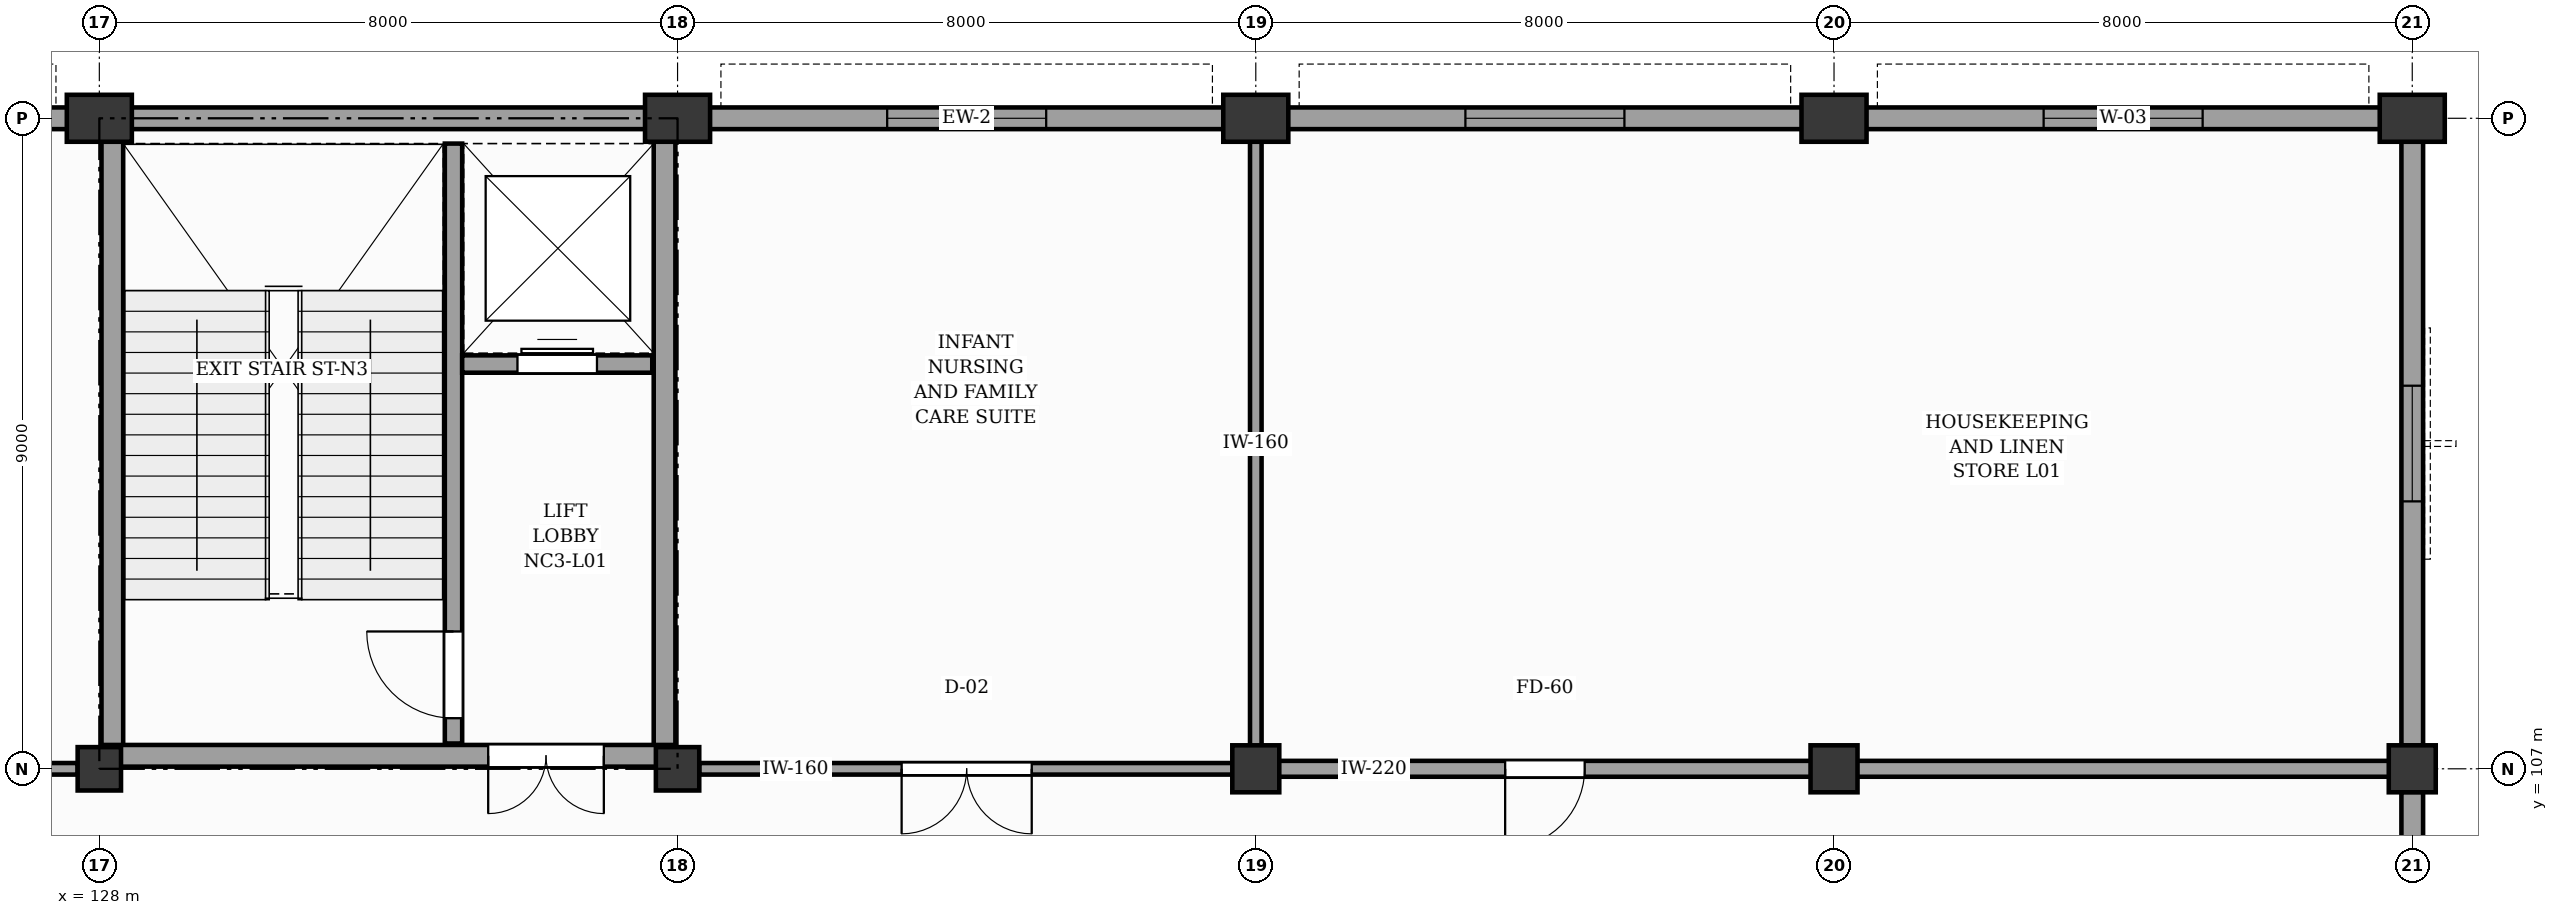
"""IFC4 building model, lengths in metres.
Left out: names, types, materials, properties, quantities, classifications, styles, units other than length and angle.
Written with IfcOpenShell. Run it as: python <this file> out.ifc"""

import sys

from ifc_helpers import new_model, si_unit, direction, frame, frame_2d, origin, origin_2d, place, context, subcontext, project, spatial, rectangle, extrude, element, fill, save


model = new_model("IFC4")
c1 = context("Model", 3, precision=1e-05, world=origin(), true_north=direction((0.0, 1.0)))
c2 = subcontext(c1, "Body", "Model", "MODEL_VIEW")
j1 = project(units=[si_unit("LENGTHUNIT", "METRE"), si_unit("PLANEANGLEUNIT", "RADIAN")], contexts=[c1])
p1 = place(None, origin())
s1 = spatial("IfcSite", under=j1, at=p1, CompositionType="ELEMENT")
p2 = place(p1, origin())
s2 = spatial("IfcBuilding", under=s1, at=p2, CompositionType="ELEMENT")
p3 = place(p2, frame((0.0, 0.0, 4.8)))
s3 = spatial("IfcBuildingStorey", under=s2, at=p3, CompositionType="ELEMENT", Elevation=4.8)
p4 = place(p3, frame((128.0, 107.0, 0.0), z_axis=(0.0, 0.0, 1.0), x_axis=(1.0, 0.0, 0.0)))
e1 = element("IfcColumn", 1, at=p4, inside=s3, PredefinedType="COLUMN", context=c2, shape_type="SweptSolid", body=[
    extrude(rectangle(XDim=0.6, YDim=0.6, at=origin_2d()), origin(), (0.0, 0.0, 1.0), 4.8),
])
p5 = place(p3, frame((128.0, 116.0, 0.0), z_axis=(0.0, 0.0, 1.0), x_axis=(1.0, 0.0, 0.0)))
e2 = element("IfcColumn", 2, at=p5, inside=s3, PredefinedType="PILASTER", context=c2, shape_type="SweptSolid", body=[
    extrude(rectangle(XDim=0.9, YDim=0.65, at=origin_2d()), origin(), (0.0, 0.0, 1.0), 4.8),
])
p6 = place(p3, frame((136.0, 107.0, 0.0), z_axis=(0.0, 0.0, 1.0), x_axis=(1.0, 0.0, 0.0)))
e3 = element("IfcColumn", 3, at=p6, inside=s3, PredefinedType="COLUMN", context=c2, shape_type="SweptSolid", body=[
    extrude(rectangle(XDim=0.6, YDim=0.6, at=origin_2d()), origin(), (0.0, 0.0, 1.0), 4.8),
])
p7 = place(p3, frame((136.0, 116.0, 0.0), z_axis=(0.0, 0.0, 1.0), x_axis=(1.0, 0.0, 0.0)))
e4 = element("IfcColumn", 4, at=p7, inside=s3, PredefinedType="PILASTER", context=c2, shape_type="SweptSolid", body=[
    extrude(rectangle(XDim=0.9, YDim=0.65, at=origin_2d()), origin(), (0.0, 0.0, 1.0), 4.8),
])
p8 = place(p3, frame((144.0, 107.0, 0.0), z_axis=(0.0, 0.0, 1.0), x_axis=(1.0, 0.0, 0.0)))
e5 = element("IfcColumn", 5, at=p8, inside=s3, PredefinedType="COLUMN", context=c2, shape_type="SweptSolid", body=[
    extrude(rectangle(XDim=0.65, YDim=0.65, at=origin_2d()), origin(), (0.0, 0.0, 1.0), 4.8),
])
p9 = place(p3, frame((144.0, 116.0, 0.0), z_axis=(0.0, 0.0, 1.0), x_axis=(1.0, 0.0, 0.0)))
e6 = element("IfcColumn", 6, at=p9, inside=s3, PredefinedType="PILASTER", context=c2, shape_type="SweptSolid", body=[
    extrude(rectangle(XDim=0.9, YDim=0.65, at=origin_2d()), origin(), (0.0, 0.0, 1.0), 4.8),
])
p10 = place(p3, frame((152.0, 107.0, 0.0), z_axis=(0.0, 0.0, 1.0), x_axis=(1.0, 0.0, 0.0)))
e7 = element("IfcColumn", 7, at=p10, inside=s3, PredefinedType="COLUMN", context=c2, shape_type="SweptSolid", body=[
    extrude(rectangle(XDim=0.65, YDim=0.65, at=origin_2d()), origin(), (0.0, 0.0, 1.0), 4.8),
])
p11 = place(p3, frame((152.0, 116.0, 0.0), z_axis=(0.0, 0.0, 1.0), x_axis=(1.0, 0.0, 0.0)))
e8 = element("IfcColumn", 8, at=p11, inside=s3, PredefinedType="PILASTER", context=c2, shape_type="SweptSolid", body=[
    extrude(rectangle(XDim=0.9, YDim=0.65, at=origin_2d()), origin(), (0.0, 0.0, 1.0), 4.8),
])
p12 = place(p3, frame((160.0, 107.0, 0.0), z_axis=(0.0, 0.0, 1.0), x_axis=(1.0, 0.0, 0.0)))
e9 = element("IfcColumn", 9, at=p12, inside=s3, PredefinedType="COLUMN", context=c2, shape_type="SweptSolid", body=[
    extrude(rectangle(XDim=0.65, YDim=0.65, at=origin_2d()), origin(), (0.0, 0.0, 1.0), 4.8),
])
p13 = place(p3, frame((160.0, 116.0, 0.0), z_axis=(0.0, 0.0, 1.0), x_axis=(1.0, 0.0, 0.0)))
e10 = element("IfcColumn", 10, at=p13, inside=s3, PredefinedType="PILASTER", context=c2, shape_type="SweptSolid", body=[
    extrude(rectangle(XDim=0.9, YDim=0.65, at=origin_2d()), origin(), (0.0, 0.0, 1.0), 4.8),
])
p14 = place(p3, frame((120.4, 116.0, 0.0), z_axis=(0.0, 0.0, 1.0), x_axis=(1.0, 0.0, 0.0)))
e11 = element("IfcWall", 11, at=p14, inside=s3, PredefinedType="SOLIDWALL", context=c2, shape_type="SweptSolid", body=[
    extrude(rectangle(XDim=7.2, YDim=0.3, at=frame_2d((3.6, 0.0))), origin(), (0.0, 0.0, 1.0), 3.18),
])
p15 = place(p14, frame((2.5, 0.0, 0.9)))
e12 = element("IfcOpeningElement", 12, at=p15, cuts=e11, PredefinedType="OPENING", context=c2, shape_type="SweptSolid", body=[
    extrude(rectangle(XDim=2.2, YDim=2.14, at=frame_2d((1.1, 1.07))), frame((0.0, 0.16, 0.0), z_axis=(0.0, -1.0, 0.0), x_axis=(1.0, 0.0, 0.0)), (0.0, 0.0, 1.0), 0.32),
])
p16 = place(p3, frame((128.4, 116.0, 0.0), z_axis=(0.0, 0.0, 1.0), x_axis=(1.0, 0.0, 0.0)))
e13 = element("IfcWall", 13, at=p16, inside=s3, PredefinedType="SOLIDWALL", context=c2, shape_type="SweptSolid", body=[
    extrude(rectangle(XDim=7.2, YDim=0.3, at=frame_2d((3.6, 0.0))), origin(), (0.0, 0.0, 1.0), 3.84),
])
p17 = place(p3, frame((136.4, 116.0, 0.0), z_axis=(0.0, 0.0, 1.0), x_axis=(1.0, 0.0, 0.0)))
e14 = element("IfcWall", 14, at=p17, inside=s3, PredefinedType="SOLIDWALL", context=c2, shape_type="SweptSolid", body=[
    extrude(rectangle(XDim=7.2, YDim=0.3, at=frame_2d((3.6, 0.0))), origin(), (0.0, 0.0, 1.0), 3.84),
])
p18 = place(p17, frame((2.5, 0.0, 0.9)))
e15 = element("IfcOpeningElement", 15, at=p18, cuts=e14, PredefinedType="OPENING", context=c2, shape_type="SweptSolid", body=[
    extrude(rectangle(XDim=2.2, YDim=2.2, at=frame_2d((1.1, 1.1))), frame((0.0, 0.16, 0.0), z_axis=(0.0, -1.0, 0.0), x_axis=(1.0, 0.0, 0.0)), (0.0, 0.0, 1.0), 0.32),
])
p19 = place(p3, frame((144.4, 116.0, 0.0), z_axis=(0.0, 0.0, 1.0), x_axis=(1.0, 0.0, 0.0)))
e16 = element("IfcWall", 16, at=p19, inside=s3, PredefinedType="SOLIDWALL", context=c2, shape_type="SweptSolid", body=[
    extrude(rectangle(XDim=7.2, YDim=0.3, at=frame_2d((3.6, 0.0))), origin(), (0.0, 0.0, 1.0), 3.84),
])
p20 = place(p19, frame((2.5, 0.0, 0.9)))
e17 = element("IfcOpeningElement", 17, at=p20, cuts=e16, PredefinedType="OPENING", context=c2, shape_type="SweptSolid", body=[
    extrude(rectangle(XDim=2.2, YDim=2.2, at=frame_2d((1.1, 1.1))), frame((0.0, 0.16, 0.0), z_axis=(0.0, -1.0, 0.0), x_axis=(1.0, 0.0, 0.0)), (0.0, 0.0, 1.0), 0.32),
])
p21 = place(p3, frame((152.4, 116.0, 0.0), z_axis=(0.0, 0.0, 1.0), x_axis=(1.0, 0.0, 0.0)))
e18 = element("IfcWall", 18, at=p21, inside=s3, PredefinedType="SOLIDWALL", context=c2, shape_type="SweptSolid", body=[
    extrude(rectangle(XDim=7.2, YDim=0.3, at=frame_2d((3.6, 0.0))), origin(), (0.0, 0.0, 1.0), 3.84),
])
p22 = place(p21, frame((2.5, 0.0, 0.9)))
e19 = element("IfcOpeningElement", 19, at=p22, cuts=e18, PredefinedType="OPENING", context=c2, shape_type="SweptSolid", body=[
    extrude(rectangle(XDim=2.2, YDim=2.2, at=frame_2d((1.1, 1.1))), frame((0.0, 0.16, 0.0), z_axis=(0.0, -1.0, 0.0), x_axis=(1.0, 0.0, 0.0)), (0.0, 0.0, 1.0), 0.32),
])
p23 = place(p3, frame((160.0, 98.32, 0.0), z_axis=(0.0, 0.0, 1.0), x_axis=(0.0, 1.0, 0.0)))
e20 = element("IfcWall", 20, at=p23, inside=s3, PredefinedType="SOLIDWALL", context=c2, shape_type="SweptSolid", body=[
    extrude(rectangle(XDim=8.36, YDim=0.3, at=frame_2d((4.18, 0.0))), origin(), (0.0, 0.0, 1.0), 3.71),
])
p24 = place(p23, frame((3.38, 0.0, 0.95)))
e21 = element("IfcOpeningElement", 21, at=p24, cuts=e20, PredefinedType="OPENING", context=c2, shape_type="SweptSolid", body=[
    extrude(rectangle(XDim=1.6, YDim=2.1, at=frame_2d((0.8, 1.05))), frame((0.0, 0.16, 0.0), z_axis=(0.0, -1.0, 0.0), x_axis=(1.0, 0.0, 0.0)), (0.0, 0.0, 1.0), 0.32),
])
p25 = place(p3, frame((160.0, 107.32, 0.0), z_axis=(0.0, 0.0, 1.0), x_axis=(0.0, 1.0, 0.0)))
e22 = element("IfcWall", 22, at=p25, inside=s3, PredefinedType="SOLIDWALL", context=c2, shape_type="SweptSolid", body=[
    extrude(rectangle(XDim=8.36, YDim=0.3, at=frame_2d((4.18, 0.0))), origin(), (0.0, 0.0, 1.0), 3.81),
])
p26 = place(p25, frame((3.38, 0.0, 0.95)))
e23 = element("IfcOpeningElement", 23, at=p26, cuts=e22, PredefinedType="OPENING", context=c2, shape_type="SweptSolid", body=[
    extrude(rectangle(XDim=1.6, YDim=2.1, at=frame_2d((0.8, 1.05))), frame((0.0, 0.16, 0.0), z_axis=(0.0, -1.0, 0.0), x_axis=(1.0, 0.0, 0.0)), (0.0, 0.0, 1.0), 0.32),
])
p27 = place(p3, frame((132.9, 107.35, 0.0), z_axis=(0.0, 0.0, 1.0), x_axis=(0.0, 1.0, 0.0)))
e24 = element("IfcWall", 24, at=p27, inside=s3, PredefinedType="SHEAR", context=c2, shape_type="SweptSolid", body=[
    extrude(rectangle(XDim=8.3, YDim=0.24, at=frame_2d((4.15, 0.0))), origin(), (0.0, 0.0, 1.0), 4.52),
])
p28 = place(p27, frame((0.35, 0.0, 0.0)))
e25 = element("IfcOpeningElement", 25, at=p28, cuts=e24, PredefinedType="OPENING", context=c2, shape_type="SweptSolid", body=[
    extrude(rectangle(XDim=1.2, YDim=2.15, at=frame_2d((0.6, 1.075))), frame((0.0, 0.13, 0.0), z_axis=(0.0, -1.0, 0.0), x_axis=(1.0, 0.0, 0.0)), (0.0, 0.0, 1.0), 0.26),
])
p29 = place(p3, frame((133.02, 112.6, 0.0), z_axis=(0.0, 0.0, 1.0), x_axis=(1.0, 0.0, 0.0)))
e26 = element("IfcWall", 26, at=p29, inside=s3, PredefinedType="SHEAR", context=c2, shape_type="SweptSolid", body=[
    extrude(rectangle(XDim=2.63, YDim=0.24, at=frame_2d((1.315, 0.0))), origin(), (0.0, 0.0, 1.0), 4.52),
])
p30 = place(p29, frame((0.765, 0.0, 0.0)))
e27 = element("IfcOpeningElement", 27, at=p30, cuts=e26, PredefinedType="OPENING", context=c2, shape_type="SweptSolid", body=[
    extrude(rectangle(XDim=1.1, YDim=2.15, at=frame_2d((0.55, 1.075))), frame((0.0, 0.13, 0.0), z_axis=(0.0, -1.0, 0.0), x_axis=(1.0, 0.0, 0.0)), (0.0, 0.0, 1.0), 0.26),
])
for number, where, z_axis, x_axis in (
    (28, (128.18, 107.18, 0.0), (0.0, 0.0, 1.0), (0.0, 1.0, 0.0)),
    (29, (135.82, 107.18, 0.0), (0.0, 0.0, 1.0), (0.0, 1.0, 0.0)),
):
    element("IfcWall", number, at=place(p3, frame(where, z_axis=z_axis, x_axis=x_axis)), inside=s3, PredefinedType="SHEAR", context=c2, shape_type="SweptSolid", body=[
        extrude(rectangle(XDim=8.64, YDim=0.3, at=frame_2d((4.32, 0.0))), origin(), (0.0, 0.0, 1.0), 4.52),
    ])
p31 = place(p3, frame((128.03, 107.18, 0.0), z_axis=(0.0, 0.0, 1.0), x_axis=(1.0, 0.0, 0.0)))
e30 = element("IfcWall", 30, at=p31, inside=s3, PredefinedType="SHEAR", context=c2, shape_type="SweptSolid", body=[
    extrude(rectangle(XDim=7.94, YDim=0.3, at=frame_2d((3.97, 0.0))), origin(), (0.0, 0.0, 1.0), 4.52),
])
p32 = place(p31, frame((5.35, 0.0, 0.0)))
e31 = element("IfcOpeningElement", 31, at=p32, cuts=e30, PredefinedType="OPENING", context=c2, shape_type="SweptSolid", body=[
    extrude(rectangle(XDim=1.6, YDim=2.15, at=frame_2d((0.8, 1.075))), frame((0.0, 0.16, 0.0), z_axis=(0.0, -1.0, 0.0), x_axis=(1.0, 0.0, 0.0)), (0.0, 0.0, 1.0), 0.32),
])
p33 = place(p3, frame((123.0, 107.0, 0.0), z_axis=(0.0, 0.0, 1.0), x_axis=(1.0, 0.0, 0.0)))
e32 = element("IfcWall", 32, at=p33, inside=s3, PredefinedType="PARTITIONING", context=c2, shape_type="SweptSolid", body=[
    extrude(rectangle(XDim=4.7, YDim=0.16, at=frame_2d((2.35, 0.0))), origin(), (0.0, 0.0, 1.0), 3.7),
])
p34 = place(p33, frame((0.2, 0.0, 0.0)))
e33 = element("IfcOpeningElement", 33, at=p34, cuts=e32, PredefinedType="OPENING", context=c2, shape_type="SweptSolid", body=[
    extrude(rectangle(XDim=1.0, YDim=2.1, at=frame_2d((0.5, 1.05))), frame((0.0, 0.09, 0.0), z_axis=(0.0, -1.0, 0.0), x_axis=(1.0, 0.0, 0.0)), (0.0, 0.0, 1.0), 0.18),
])
p35 = place(p3, frame((136.3, 107.0, 0.0), z_axis=(0.0, 0.0, 1.0), x_axis=(1.0, 0.0, 0.0)))
e34 = element("IfcWall", 34, at=p35, inside=s3, PredefinedType="PARTITIONING", context=c2, shape_type="SweptSolid", body=[
    extrude(rectangle(XDim=7.4, YDim=0.16, at=frame_2d((3.7, 0.0))), origin(), (0.0, 0.0, 1.0), 3.7),
])
p36 = place(p35, frame((2.8, 0.0, 0.0)))
e35 = element("IfcOpeningElement", 35, at=p36, cuts=e34, PredefinedType="OPENING", context=c2, shape_type="SweptSolid", body=[
    extrude(rectangle(XDim=1.8, YDim=2.25, at=frame_2d((0.9, 1.125))), frame((0.0, 0.09, 0.0), z_axis=(0.0, -1.0, 0.0), x_axis=(1.0, 0.0, 0.0)), (0.0, 0.0, 1.0), 0.18),
])
p37 = place(p3, frame((144.0, 107.3, 0.0), z_axis=(0.0, 0.0, 1.0), x_axis=(0.0, 1.0, 0.0)))
e36 = element("IfcWall", 36, at=p37, inside=s3, PredefinedType="PARTITIONING", context=c2, shape_type="SweptSolid", body=[
    extrude(rectangle(XDim=8.4, YDim=0.16, at=frame_2d((4.2, 0.0))), origin(), (0.0, 0.0, 1.0), 3.7),
])
p38 = place(p3, frame((144.3, 107.0, 0.0), z_axis=(0.0, 0.0, 1.0), x_axis=(1.0, 0.0, 0.0)))
e37 = element("IfcWall", 37, at=p38, inside=s3, PredefinedType="SOLIDWALL", context=c2, shape_type="SweptSolid", body=[
    extrude(rectangle(XDim=7.4, YDim=0.22, at=frame_2d((3.7, 0.0))), origin(), (0.0, 0.0, 1.0), 3.7),
])
p39 = place(p38, frame((3.15, 0.0, 0.0)))
e38 = element("IfcOpeningElement", 38, at=p39, cuts=e37, PredefinedType="OPENING", context=c2, shape_type="SweptSolid", body=[
    extrude(rectangle(XDim=1.1, YDim=2.15, at=frame_2d((0.55, 1.075))), frame((0.0, 0.12, 0.0), z_axis=(0.0, -1.0, 0.0), x_axis=(1.0, 0.0, 0.0)), (0.0, 0.0, 1.0), 0.24),
])
p40 = place(p3, frame((152.3, 107.0, 0.0), z_axis=(0.0, 0.0, 1.0), x_axis=(1.0, 0.0, 0.0)))
e39 = element("IfcWall", 39, at=p40, inside=s3, PredefinedType="SOLIDWALL", context=c2, shape_type="SweptSolid", body=[
    extrude(rectangle(XDim=7.4, YDim=0.22, at=frame_2d((3.7, 0.0))), origin(), (0.0, 0.0, 1.0), 3.7),
])
p41 = place(p18, origin())
e40 = element("IfcWindow", 40, at=p41, inside=s3, PartitioningType="SINGLE_PANEL", PredefinedType="WINDOW", context=c2, shape_type="SweptSolid", body=[
    extrude(rectangle(XDim=2.2, YDim=2.2, at=frame_2d((1.1, 1.1))), frame((0.0, 0.03, 0.0), z_axis=(0.0, -1.0, 0.0), x_axis=(1.0, 0.0, 0.0)), (0.0, 0.0, 1.0), 0.06),
])
fill(e15, e40)
p42 = place(p20, origin())
e41 = element("IfcWindow", 41, at=p42, inside=s3, PartitioningType="SINGLE_PANEL", PredefinedType="WINDOW", context=c2, shape_type="SweptSolid", body=[
    extrude(rectangle(XDim=2.2, YDim=2.2, at=frame_2d((1.1, 1.1))), frame((0.0, 0.03, 0.0), z_axis=(0.0, -1.0, 0.0), x_axis=(1.0, 0.0, 0.0)), (0.0, 0.0, 1.0), 0.06),
])
fill(e17, e41)
p43 = place(p22, origin())
e42 = element("IfcWindow", 42, at=p43, inside=s3, PartitioningType="SINGLE_PANEL", PredefinedType="WINDOW", context=c2, shape_type="SweptSolid", body=[
    extrude(rectangle(XDim=2.2, YDim=2.2, at=frame_2d((1.1, 1.1))), frame((0.0, 0.03, 0.0), z_axis=(0.0, -1.0, 0.0), x_axis=(1.0, 0.0, 0.0)), (0.0, 0.0, 1.0), 0.06),
])
fill(e19, e42)
p44 = place(p26, origin())
e43 = element("IfcWindow", 43, at=p44, inside=s3, PartitioningType="SINGLE_PANEL", PredefinedType="WINDOW", context=c2, shape_type="SweptSolid", body=[
    extrude(rectangle(XDim=1.6, YDim=2.1, at=frame_2d((0.8, 1.05))), frame((0.0, 0.03, 0.0), z_axis=(0.0, -1.0, 0.0), x_axis=(1.0, 0.0, 0.0)), (0.0, 0.0, 1.0), 0.06),
])
fill(e23, e43)
p45 = place(p28, origin())
e44 = element("IfcDoor", 44, at=p45, inside=s3, OperationType="SINGLE_SWING_RIGHT", PredefinedType="DOOR", context=c2, shape_type="SweptSolid", body=[
    extrude(rectangle(XDim=1.2, YDim=2.15, at=frame_2d((0.6, 1.075))), frame((0.0, 0.025, 0.0), z_axis=(0.0, -1.0, 0.0), x_axis=(1.0, 0.0, 0.0)), (0.0, 0.0, 1.0), 0.05),
])
fill(e25, e44)
p46 = place(p30, origin())
e45 = element("IfcDoor", 45, at=p46, inside=s3, OperationType="DOUBLE_DOOR_SLIDING", PredefinedType="DOOR", context=c2, shape_type="SweptSolid", body=[
    extrude(rectangle(XDim=1.1, YDim=2.15, at=frame_2d((0.55, 1.075))), frame((0.0, 0.025, 0.0), z_axis=(0.0, -1.0, 0.0), x_axis=(1.0, 0.0, 0.0)), (0.0, 0.0, 1.0), 0.05),
])
fill(e27, e45)
p47 = place(p32, frame((1.6, 0.0, 0.0), z_axis=(0.0, 0.0, 1.0), x_axis=(-1.0, 0.0, 0.0)))
e46 = element("IfcDoor", 46, at=p47, inside=s3, OperationType="DOUBLE_DOOR_SINGLE_SWING", PredefinedType="DOOR", context=c2, shape_type="SweptSolid", body=[
    extrude(rectangle(XDim=1.6, YDim=2.15, at=frame_2d((0.8, 1.075))), frame((0.0, 0.025, 0.0), z_axis=(0.0, -1.0, 0.0), x_axis=(1.0, 0.0, 0.0)), (0.0, 0.0, 1.0), 0.05),
])
fill(e31, e46)
p48 = place(p36, frame((1.8, 0.0, 0.0), z_axis=(0.0, 0.0, 1.0), x_axis=(-1.0, 0.0, 0.0)))
e47 = element("IfcDoor", 47, at=p48, inside=s3, OperationType="DOUBLE_DOOR_SINGLE_SWING", PredefinedType="DOOR", context=c2, shape_type="SweptSolid", body=[
    extrude(rectangle(XDim=1.8, YDim=2.25, at=frame_2d((0.9, 1.125))), frame((0.0, 0.025, 0.0), z_axis=(0.0, -1.0, 0.0), x_axis=(1.0, 0.0, 0.0)), (0.0, 0.0, 1.0), 0.05),
])
fill(e35, e47)
p49 = place(p39, frame((1.1, 0.0, 0.0), z_axis=(0.0, 0.0, 1.0), x_axis=(-1.0, 0.0, 0.0)))
e48 = element("IfcDoor", 48, at=p49, inside=s3, OperationType="SINGLE_SWING_LEFT", PredefinedType="DOOR", context=c2, shape_type="SweptSolid", body=[
    extrude(rectangle(XDim=1.1, YDim=2.15, at=frame_2d((0.55, 1.075))), frame((0.0, 0.025, 0.0), z_axis=(0.0, -1.0, 0.0), x_axis=(1.0, 0.0, 0.0)), (0.0, 0.0, 1.0), 0.05),
])
fill(e38, e48)
save(model, sys.argv[1])
